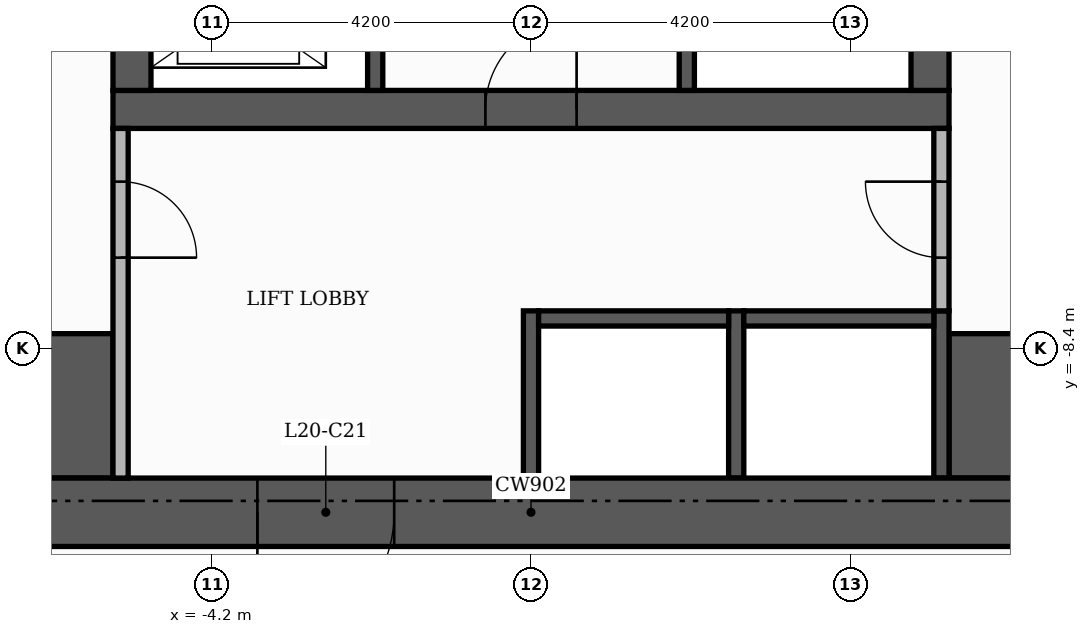
"""IFC4 building model, lengths in metres.
Left out: names, types, materials, properties, quantities, classifications, styles, units other than length and angle.
Written with IfcOpenShell. Run it as: python <this file> out.ifc"""

import sys

from ifc_helpers import new_model, si_unit, direction, frame, frame_2d, origin, place, context, subcontext, project, spatial, rectangle, extrude, element, fill, save


model = new_model("IFC4")
c1 = context("Model", 3, precision=1e-05, world=origin(), true_north=direction((0.0, 1.0)))
c2 = subcontext(c1, "Body", "Model", "MODEL_VIEW")
j1 = project(units=[si_unit("LENGTHUNIT", "METRE"), si_unit("PLANEANGLEUNIT", "RADIAN")], contexts=[c1])
p1 = place(None, origin())
s1 = spatial("IfcSite", under=j1, at=p1, CompositionType="ELEMENT")
p2 = place(p1, origin())
s2 = spatial("IfcBuilding", under=s1, at=p2, CompositionType="ELEMENT")
p3 = place(p2, frame((0.0, 0.0, 87.0)))
s3 = spatial("IfcBuildingStorey", under=s2, at=p3, CompositionType="ELEMENT", Elevation=87.0)
p4 = place(p3, frame((-5.5, -5.25, 0.0), z_axis=(0.0, 0.0, 1.0), x_axis=(1.0, 0.0, 0.0)))
e1 = element("IfcWall", 1, at=p4, inside=s3, PredefinedType="SHEAR", context=c2, shape_type="SweptSolid", body=[
    extrude(rectangle(XDim=11.0, YDim=0.5, at=frame_2d((5.5, 0.0))), origin(), (0.0, 0.0, 1.0), 3.48),
])
p5 = place(p4, frame((4.9, 0.0, 0.0)))
e2 = element("IfcOpeningElement", 2, at=p5, cuts=e1, PredefinedType="OPENING", context=c2, shape_type="SweptSolid", body=[
    extrude(rectangle(XDim=1.2, YDim=2.1, at=frame_2d((0.6, 1.05))), frame((0.0, 0.26, 0.0), z_axis=(0.0, -1.0, 0.0), x_axis=(1.0, 0.0, 0.0)), (0.0, 0.0, 1.0), 0.52),
])
for number, where, z_axis, x_axis in (
    (3, (-5.25, -5.0, 0.0), (0.0, 0.0, 1.0), (0.0, 1.0, 0.0)),
    (4, (5.25, -5.0, 0.0), (0.0, 0.0, 1.0), (0.0, 1.0, 0.0)),
):
    element("IfcWall", number, at=place(p3, frame(where, z_axis=z_axis, x_axis=x_axis)), inside=s3, PredefinedType="SHEAR", context=c2, shape_type="SweptSolid", body=[
        extrude(rectangle(XDim=10.5, YDim=0.5, at=frame_2d((5.25, 0.0))), origin(), (0.0, 0.0, 1.0), 3.48),
    ])
for number, where, z_axis, x_axis in (
    (5, (-10.1, -9.15, 0.0), (0.0, 0.0, 1.0), (1.0, 0.0, 0.0)),
    (6, (5.5, -9.15, 0.0), (0.0, 0.0, 1.0), (1.0, 0.0, 0.0)),
):
    element("IfcWall", number, at=place(p3, frame(where, z_axis=z_axis, x_axis=x_axis)), inside=s3, PredefinedType="SHEAR", context=c2, shape_type="SweptSolid", body=[
        extrude(rectangle(XDim=4.6, YDim=1.9, at=frame_2d((2.3, 0.0))), origin(), (0.0, 0.0, 1.0), 3.48),
    ])
p6 = place(p3, frame((2.05, -5.0, 0.0), z_axis=(0.0, 0.0, 1.0), x_axis=(0.0, 1.0, 0.0)))
e7 = element("IfcWall", 7, at=p6, inside=s3, PredefinedType="SHEAR", context=c2, shape_type="SweptSolid", body=[
    extrude(rectangle(XDim=6.6, YDim=0.2, at=frame_2d((3.3, 0.0))), origin(), (0.0, 0.0, 1.0), 3.48),
])
p7 = place(p6, frame((5.25, 0.0, 0.0)))
e8 = element("IfcOpeningElement", 8, at=p7, cuts=e7, PredefinedType="OPENING", context=c2, shape_type="SweptSolid", body=[
    extrude(rectangle(XDim=1.0, YDim=2.1, at=frame_2d((0.5, 1.05))), frame((0.0, 0.11, 0.0), z_axis=(0.0, -1.0, 0.0), x_axis=(1.0, 0.0, 0.0)), (0.0, 0.0, 1.0), 0.22),
])
for number, where, z_axis, x_axis in (
    (9, (0.0, -10.1, 0.0), (0.0, 0.0, 1.0), (0.0, 1.0, 0.0)),
    (10, (2.7, -10.1, 0.0), (0.0, 0.0, 1.0), (0.0, 1.0, 0.0)),
    (11, (5.4, -10.1, 0.0), (0.0, 0.0, 1.0), (0.0, 1.0, 0.0)),
):
    element("IfcWall", number, at=place(p3, frame(where, z_axis=z_axis, x_axis=x_axis)), inside=s3, PredefinedType="SHEAR", context=c2, shape_type="SweptSolid", body=[
        extrude(rectangle(XDim=2.2, YDim=0.2, at=frame_2d((1.1, 0.0))), origin(), (0.0, 0.0, 1.0), 3.48),
    ])
for number, where, z_axis, x_axis in (
    (12, (0.1, -8.0, 0.0), (0.0, 0.0, 1.0), (1.0, 0.0, 0.0)),
    (13, (2.8, -8.0, 0.0), (0.0, 0.0, 1.0), (1.0, 0.0, 0.0)),
):
    element("IfcWall", number, at=place(p3, frame(where, z_axis=z_axis, x_axis=x_axis)), inside=s3, PredefinedType="SHEAR", context=c2, shape_type="SweptSolid", body=[
        extrude(rectangle(XDim=2.5, YDim=0.2, at=frame_2d((1.25, 0.0))), origin(), (0.0, 0.0, 1.0), 3.48),
    ])
p8 = place(p3, frame((-2.05, -5.0, 0.0), z_axis=(0.0, 0.0, 1.0), x_axis=(0.0, 1.0, 0.0)))
e14 = element("IfcWall", 14, at=p8, inside=s3, PredefinedType="SHEAR", context=c2, shape_type="SweptSolid", body=[
    extrude(rectangle(XDim=3.4, YDim=0.2, at=frame_2d((1.7, 0.0))), origin(), (0.0, 0.0, 1.0), 3.48),
])
p9 = place(p8, frame((0.55, 0.0, 0.0)))
e15 = element("IfcOpeningElement", 15, at=p9, cuts=e14, PredefinedType="OPENING", context=c2, shape_type="SweptSolid", body=[
    extrude(rectangle(XDim=1.1, YDim=2.1, at=frame_2d((0.55, 1.05))), frame((0.0, 0.11, 0.0), z_axis=(0.0, -1.0, 0.0), x_axis=(1.0, 0.0, 0.0)), (0.0, 0.0, 1.0), 0.22),
])
p10 = place(p8, frame((2.45, 0.0, 0.0)))
e16 = element("IfcOpeningElement", 16, at=p10, cuts=e14, PredefinedType="OPENING", context=c2, shape_type="SweptSolid", body=[
    extrude(rectangle(XDim=0.8, YDim=2.1, at=frame_2d((0.4, 1.05))), frame((0.0, 0.11, 0.0), z_axis=(0.0, -1.0, 0.0), x_axis=(1.0, 0.0, 0.0)), (0.0, 0.0, 1.0), 0.22),
])
p11 = place(p3, frame((-11.0, -10.55, 0.0), z_axis=(0.0, 0.0, 1.0), x_axis=(1.0, 0.0, 0.0)))
e17 = element("IfcWall", 17, at=p11, inside=s3, PredefinedType="SHEAR", context=c2, shape_type="SweptSolid", body=[
    extrude(rectangle(XDim=22.0, YDim=0.9, at=frame_2d((11.0, 0.0))), origin(), (0.0, 0.0, 1.0), 3.48),
])
p12 = place(p11, frame((7.4, 0.0, 0.0)))
e18 = element("IfcOpeningElement", 18, at=p12, cuts=e17, PredefinedType="OPENING", context=c2, shape_type="SweptSolid", body=[
    extrude(rectangle(XDim=1.8, YDim=2.2, at=frame_2d((0.9, 1.1))), frame((0.0, 0.46, 0.0), z_axis=(0.0, -1.0, 0.0), x_axis=(1.0, 0.0, 0.0)), (0.0, 0.0, 1.0), 0.92),
])
p13 = place(p3, frame((-5.4, -10.1, 0.0), z_axis=(0.0, 0.0, 1.0), x_axis=(0.0, 1.0, 0.0)))
e19 = element("IfcWall", 19, at=p13, inside=s3, PredefinedType="PARTITIONING", context=c2, shape_type="SweptSolid", body=[
    extrude(rectangle(XDim=4.6, YDim=0.2, at=frame_2d((2.3, 0.0))), origin(), (0.0, 0.0, 1.0), 3.48),
])
p14 = place(p13, frame((2.9, 0.0, 0.0)))
e20 = element("IfcOpeningElement", 20, at=p14, cuts=e19, PredefinedType="OPENING", context=c2, shape_type="SweptSolid", body=[
    extrude(rectangle(XDim=1.0, YDim=2.1, at=frame_2d((0.5, 1.05))), frame((0.0, 0.11, 0.0), z_axis=(0.0, -1.0, 0.0), x_axis=(1.0, 0.0, 0.0)), (0.0, 0.0, 1.0), 0.22),
])
p15 = place(p3, frame((5.4, -7.9, 0.0), z_axis=(0.0, 0.0, 1.0), x_axis=(0.0, 1.0, 0.0)))
e21 = element("IfcWall", 21, at=p15, inside=s3, PredefinedType="PARTITIONING", context=c2, shape_type="SweptSolid", body=[
    extrude(rectangle(XDim=2.4, YDim=0.2, at=frame_2d((1.2, 0.0))), origin(), (0.0, 0.0, 1.0), 3.48),
])
p16 = place(p15, frame((0.7, 0.0, 0.0)))
e22 = element("IfcOpeningElement", 22, at=p16, cuts=e21, PredefinedType="OPENING", context=c2, shape_type="SweptSolid", body=[
    extrude(rectangle(XDim=1.0, YDim=2.1, at=frame_2d((0.5, 1.05))), frame((0.0, 0.11, 0.0), z_axis=(0.0, -1.0, 0.0), x_axis=(1.0, 0.0, 0.0)), (0.0, 0.0, 1.0), 0.22),
])
p17 = place(p5, origin())
e23 = element("IfcDoor", 23, at=p17, inside=s3, OperationType="SINGLE_SWING_RIGHT", PredefinedType="DOOR", context=c2, shape_type="SweptSolid", body=[
    extrude(rectangle(XDim=1.2, YDim=2.1, at=frame_2d((0.6, 1.05))), frame((0.0, 0.025, 0.0), z_axis=(0.0, -1.0, 0.0), x_axis=(1.0, 0.0, 0.0)), (0.0, 0.0, 1.0), 0.05),
])
fill(e2, e23)
p18 = place(p14, frame((1.0, 0.0, 0.0), z_axis=(0.0, 0.0, 1.0), x_axis=(-1.0, 0.0, 0.0)))
e24 = element("IfcDoor", 24, at=p18, inside=s3, OperationType="SINGLE_SWING_LEFT", PredefinedType="DOOR", context=c2, shape_type="SweptSolid", body=[
    extrude(rectangle(XDim=1.0, YDim=2.1, at=frame_2d((0.5, 1.05))), frame((0.0, 0.025, 0.0), z_axis=(0.0, -1.0, 0.0), x_axis=(1.0, 0.0, 0.0)), (0.0, 0.0, 1.0), 0.05),
])
fill(e20, e24)
p19 = place(p16, origin())
e25 = element("IfcDoor", 25, at=p19, inside=s3, OperationType="SINGLE_SWING_RIGHT", PredefinedType="DOOR", context=c2, shape_type="SweptSolid", body=[
    extrude(rectangle(XDim=1.0, YDim=2.1, at=frame_2d((0.5, 1.05))), frame((0.0, 0.025, 0.0), z_axis=(0.0, -1.0, 0.0), x_axis=(1.0, 0.0, 0.0)), (0.0, 0.0, 1.0), 0.05),
])
fill(e22, e25)
p20 = place(p12, frame((1.8, 0.0, 0.0), z_axis=(0.0, 0.0, 1.0), x_axis=(-1.0, 0.0, 0.0)))
e26 = element("IfcDoor", 26, at=p20, inside=s3, OperationType="DOUBLE_DOOR_SINGLE_SWING", PredefinedType="DOOR", context=c2, shape_type="SweptSolid", body=[
    extrude(rectangle(XDim=1.8, YDim=2.2, at=frame_2d((0.9, 1.1))), frame((0.0, 0.025, 0.0), z_axis=(0.0, -1.0, 0.0), x_axis=(1.0, 0.0, 0.0)), (0.0, 0.0, 1.0), 0.05),
])
fill(e18, e26)
save(model, sys.argv[1])
